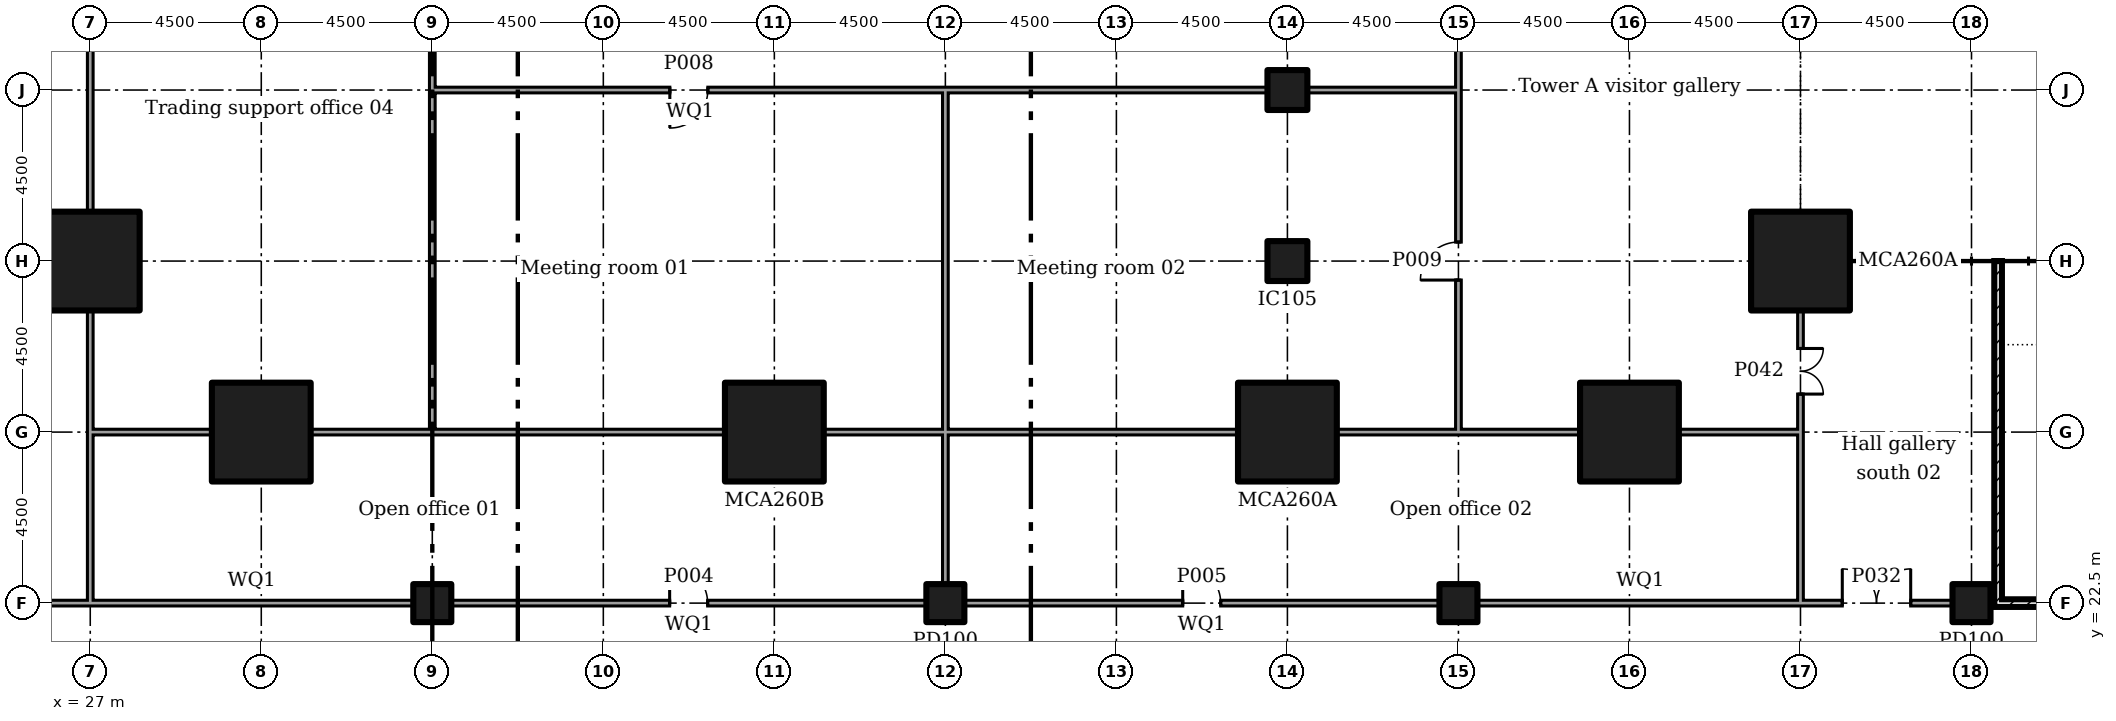
"""IFC4 building model, lengths in metres.
Left out: names, types, materials, properties, quantities, classifications, styles, units other than length and angle.
Written with IfcOpenShell. Run it as: python <this file> out.ifc"""

import sys

from ifc_helpers import new_model, si_unit, direction, frame, frame_2d, origin, origin_2d, place, context, subcontext, project, spatial, rectangle, extrude, element, fill, save


model = new_model("IFC4")
c1 = context("Model", 3, precision=1e-05, world=origin(), true_north=direction((0.0, 1.0)))
c2 = subcontext(c1, "Body", "Model", "MODEL_VIEW")
j1 = project(units=[si_unit("LENGTHUNIT", "METRE"), si_unit("PLANEANGLEUNIT", "RADIAN")], contexts=[c1])
p1 = place(None, origin())
s1 = spatial("IfcSite", under=j1, at=p1, CompositionType="ELEMENT")
p2 = place(p1, origin())
s2 = spatial("IfcBuilding", under=s1, at=p2, CompositionType="ELEMENT")
p3 = place(p2, frame((0.0, 0.0, 11.5)))
s3 = spatial("IfcBuildingStorey", under=s2, at=p3, CompositionType="ELEMENT", Elevation=11.5)
for number, where in (
    (1, (27.0, 31.5, 0.0)),
    (2, (31.5, 27.0, 0.0)),
    (3, (45.0, 27.0, 0.0)),
    (4, (58.5, 27.0, 0.0)),
    (5, (67.5, 27.0, 0.0)),
    (6, (72.0, 31.5, 0.0)),
):
    element("IfcColumn", number, at=place(p3, frame(where)), inside=s3, PredefinedType="COLUMN", context=c2, shape_type="SweptSolid", body=[
        extrude(rectangle(XDim=2.6, YDim=2.6, at=origin_2d()), origin(), (0.0, 0.0, 1.0), 5.0),
    ])
for number, where in (
    (7, (58.5, 31.5, 0.0)),
    (8, (58.5, 36.0, 0.0)),
):
    element("IfcColumn", number, at=place(p3, frame(where)), inside=s3, PredefinedType="COLUMN", context=c2, shape_type="SweptSolid", body=[
        extrude(rectangle(XDim=1.05, YDim=1.05, at=origin_2d()), origin(), (0.0, 0.0, 1.0), 5.0),
    ])
for number, where in (
    (9, (36.0, 22.5, 0.0)),
    (10, (49.5, 22.5, 0.0)),
    (11, (63.0, 22.5, 0.0)),
    (12, (76.5, 22.5, 0.0)),
):
    element("IfcColumn", number, at=place(p3, frame(where)), inside=s3, PredefinedType="COLUMN", context=c2, shape_type="SweptSolid", body=[
        extrude(rectangle(XDim=1.0, YDim=1.0, at=origin_2d()), origin(), (0.0, 0.0, 1.0), 5.0),
    ])
p4 = place(p2, frame((0.0, 0.0, 6.0)))
s4 = spatial("IfcBuildingStorey", under=s2, at=p4, CompositionType="ELEMENT", Elevation=6.0)
p5 = place(p4, frame((72.0, 32.795, 0.0), z_axis=(0.0, 0.0, 1.0), x_axis=(0.0, 1.0, 0.0)))
e13 = element("IfcWall", 13, at=p5, inside=s4, PredefinedType="SOLIDWALL", context=c2, shape_type="SweptSolid", body=[
    extrude(rectangle(XDim=10.91, YDim=0.3, at=frame_2d((5.455, 0.0))), origin(), (0.0, 0.0, 1.0), 10.05),
])
p6 = place(p5, frame((4.55, 0.0, 0.0)))
e14 = element("IfcOpeningElement", 14, at=p6, cuts=e13, PredefinedType="OPENING", context=c2, shape_type="SweptSolid", body=[
    extrude(rectangle(XDim=1.8, YDim=2.1, at=frame_2d((0.9, 1.05))), frame((0.0, 0.16, 0.0), z_axis=(0.0, -1.0, 0.0), x_axis=(1.0, 0.0, 0.0)), (0.0, 0.0, 1.0), 0.32),
])
p7 = place(p3, frame((22.995, 22.5, 0.0)))
e15 = element("IfcWall", 15, at=p7, inside=s3, PredefinedType="PARTITIONING", context=c2, shape_type="SweptSolid", body=[
    extrude(rectangle(XDim=4.08, YDim=0.15, at=frame_2d((2.04, 0.0))), origin(), (0.0, 0.0, 1.0), 4.55),
])
p8 = place(p3, frame((27.0, 22.5, 0.0)))
e16 = element("IfcWall", 16, at=p8, inside=s3, PredefinedType="PARTITIONING", context=c2, shape_type="SweptSolid", body=[
    extrude(rectangle(XDim=8.505, YDim=0.15, at=frame_2d((4.252, 0.0))), origin(), (0.0, 0.0, 1.0), 4.55),
])
p9 = place(p3, frame((36.495, 22.5, 0.0)))
e17 = element("IfcWall", 17, at=p9, inside=s3, PredefinedType="PARTITIONING", context=c2, shape_type="SweptSolid", body=[
    extrude(rectangle(XDim=12.51, YDim=0.15, at=frame_2d((6.255, 0.0))), origin(), (0.0, 0.0, 1.0), 4.55),
])
p10 = place(p9, frame((5.75, 0.0, 0.0)))
e18 = element("IfcOpeningElement", 18, at=p10, cuts=e17, PredefinedType="OPENING", context=c2, shape_type="SweptSolid", body=[
    extrude(rectangle(XDim=1.0, YDim=2.1, at=frame_2d((0.5, 1.05))), frame((0.0, 0.085, 0.0), z_axis=(0.0, -1.0, 0.0), x_axis=(1.0, 0.0, 0.0)), (0.0, 0.0, 1.0), 0.17),
])
p11 = place(p3, frame((49.995, 22.5, 0.0)))
e19 = element("IfcWall", 19, at=p11, inside=s3, PredefinedType="PARTITIONING", context=c2, shape_type="SweptSolid", body=[
    extrude(rectangle(XDim=12.51, YDim=0.15, at=frame_2d((6.255, 0.0))), origin(), (0.0, 0.0, 1.0), 4.55),
])
p12 = place(p11, frame((5.75, 0.0, 0.0)))
e20 = element("IfcOpeningElement", 20, at=p12, cuts=e19, PredefinedType="OPENING", context=c2, shape_type="SweptSolid", body=[
    extrude(rectangle(XDim=1.0, YDim=2.1, at=frame_2d((0.5, 1.05))), frame((0.0, 0.085, 0.0), z_axis=(0.0, -1.0, 0.0), x_axis=(1.0, 0.0, 0.0)), (0.0, 0.0, 1.0), 0.17),
])
p13 = place(p3, frame((63.495, 22.5, 0.0)))
e21 = element("IfcWall", 21, at=p13, inside=s3, PredefinedType="PARTITIONING", context=c2, shape_type="SweptSolid", body=[
    extrude(rectangle(XDim=8.58, YDim=0.15, at=frame_2d((4.29, 0.0))), origin(), (0.0, 0.0, 1.0), 4.55),
])
p14 = place(p3, frame((72.0, 22.5, 0.0)))
e22 = element("IfcWall", 22, at=p14, inside=s3, PredefinedType="PARTITIONING", context=c2, shape_type="SweptSolid", body=[
    extrude(rectangle(XDim=4.005, YDim=0.15, at=frame_2d((2.002, 0.0))), origin(), (0.0, 0.0, 1.0), 4.55),
])
p15 = place(p14, frame((1.1, 0.0, 0.0)))
e23 = element("IfcOpeningElement", 23, at=p15, cuts=e22, PredefinedType="OPENING", context=c2, shape_type="SweptSolid", body=[
    extrude(rectangle(XDim=1.8, YDim=2.1, at=frame_2d((0.9, 1.05))), frame((0.0, 0.085, 0.0), z_axis=(0.0, -1.0, 0.0), x_axis=(1.0, 0.0, 0.0)), (0.0, 0.0, 1.0), 0.17),
])
p16 = place(p3, frame((77.1, 22.5, 0.0)))
e24 = element("IfcWall", 24, at=p16, inside=s3, PredefinedType="SOLIDWALL", context=c2, shape_type="SweptSolid", body=[
    extrude(rectangle(XDim=4.6, YDim=0.2, at=frame_2d((2.3, 0.0))), origin(), (0.0, 0.0, 1.0), 4.55),
])
p17 = place(p3, frame((27.0, 22.575, 0.0), z_axis=(0.0, 0.0, 1.0), x_axis=(0.0, 1.0, 0.0)))
e25 = element("IfcWall", 25, at=p17, inside=s3, PredefinedType="PARTITIONING", context=c2, shape_type="SweptSolid", body=[
    extrude(rectangle(XDim=4.5, YDim=0.15, at=frame_2d((2.25, 0.0))), origin(), (0.0, 0.0, 1.0), 4.55),
])
p18 = place(p3, frame((27.0, 27.0, 0.0), z_axis=(0.0, 0.0, 1.0), x_axis=(0.0, 1.0, 0.0)))
e26 = element("IfcWall", 26, at=p18, inside=s3, PredefinedType="PARTITIONING", context=c2, shape_type="SweptSolid", body=[
    extrude(rectangle(XDim=3.205, YDim=0.15, at=frame_2d((1.603, 0.0))), origin(), (0.0, 0.0, 1.0), 4.55),
])
p19 = place(p3, frame((27.0, 32.795, 0.0), z_axis=(0.0, 0.0, 1.0), x_axis=(0.0, 1.0, 0.0)))
e27 = element("IfcWall", 27, at=p19, inside=s3, PredefinedType="PARTITIONING", context=c2, shape_type="SweptSolid", body=[
    extrude(rectangle(XDim=7.63, YDim=0.15, at=frame_2d((3.815, 0.0))), origin(), (0.0, 0.0, 1.0), 4.55),
])
p20 = place(p3, frame((49.5, 22.995, 0.0), z_axis=(0.0, 0.0, 1.0), x_axis=(0.0, 1.0, 0.0)))
e28 = element("IfcWall", 28, at=p20, inside=s3, PredefinedType="PARTITIONING", context=c2, shape_type="SweptSolid", body=[
    extrude(rectangle(XDim=4.08, YDim=0.15, at=frame_2d((2.04, 0.0))), origin(), (0.0, 0.0, 1.0), 4.55),
])
p21 = place(p3, frame((35.925, 27.0, 0.0)))
e29 = element("IfcWall", 29, at=p21, inside=s3, PredefinedType="PARTITIONING", context=c2, shape_type="SweptSolid", body=[
    extrude(rectangle(XDim=7.78, YDim=0.15, at=frame_2d((3.89, 0.0))), origin(), (0.0, 0.0, 1.0), 4.55),
])
p22 = place(p3, frame((46.295, 27.0, 0.0)))
e30 = element("IfcWall", 30, at=p22, inside=s3, PredefinedType="PARTITIONING", context=c2, shape_type="SweptSolid", body=[
    extrude(rectangle(XDim=3.28, YDim=0.15, at=frame_2d((1.64, 0.0))), origin(), (0.0, 0.0, 1.0), 4.55),
])
p23 = place(p3, frame((27.075, 27.0, 0.0)))
e31 = element("IfcWall", 31, at=p23, inside=s3, PredefinedType="PARTITIONING", context=c2, shape_type="SweptSolid", body=[
    extrude(rectangle(XDim=3.13, YDim=0.15, at=frame_2d((1.565, 0.0))), origin(), (0.0, 0.0, 1.0), 4.55),
])
p24 = place(p3, frame((32.795, 27.0, 0.0)))
e32 = element("IfcWall", 32, at=p24, inside=s3, PredefinedType="PARTITIONING", context=c2, shape_type="SweptSolid", body=[
    extrude(rectangle(XDim=3.205, YDim=0.15, at=frame_2d((1.603, 0.0))), origin(), (0.0, 0.0, 1.0), 4.55),
])
for number, where in (
    (33, (62.925, 27.0, 0.0)),
    (34, (68.795, 27.0, 0.0)),
):
    element("IfcWall", number, at=place(p3, frame(where)), inside=s3, PredefinedType="PARTITIONING", context=c2, shape_type="SweptSolid", body=[
        extrude(rectangle(XDim=3.28, YDim=0.15, at=frame_2d((1.64, 0.0))), origin(), (0.0, 0.0, 1.0), 4.55),
    ])
p25 = place(p3, frame((49.575, 27.0, 0.0)))
e35 = element("IfcWall", 35, at=p25, inside=s3, PredefinedType="PARTITIONING", context=c2, shape_type="SweptSolid", body=[
    extrude(rectangle(XDim=7.63, YDim=0.15, at=frame_2d((3.815, 0.0))), origin(), (0.0, 0.0, 1.0), 4.55),
])
p26 = place(p3, frame((59.795, 27.0, 0.0)))
e36 = element("IfcWall", 36, at=p26, inside=s3, PredefinedType="PARTITIONING", context=c2, shape_type="SweptSolid", body=[
    extrude(rectangle(XDim=3.205, YDim=0.15, at=frame_2d((1.603, 0.0))), origin(), (0.0, 0.0, 1.0), 4.55),
])
p27 = place(p3, frame((72.0, 22.575, 0.0), z_axis=(0.0, 0.0, 1.0), x_axis=(0.0, 1.0, 0.0)))
e37 = element("IfcWall", 37, at=p27, inside=s3, PredefinedType="PARTITIONING", context=c2, shape_type="SweptSolid", body=[
    extrude(rectangle(XDim=4.35, YDim=0.15, at=frame_2d((2.175, 0.0))), origin(), (0.0, 0.0, 1.0), 4.55),
])
p28 = place(p3, frame((63.0, 27.075, 0.0), z_axis=(0.0, 0.0, 1.0), x_axis=(0.0, 1.0, 0.0)))
e38 = element("IfcWall", 38, at=p28, inside=s3, PredefinedType="PARTITIONING", context=c2, shape_type="SweptSolid", body=[
    extrude(rectangle(XDim=9.0, YDim=0.15, at=frame_2d((4.5, 0.0))), origin(), (0.0, 0.0, 1.0), 4.55),
])
p29 = place(p28, frame((3.925, 0.0, 0.0)))
e39 = element("IfcOpeningElement", 39, at=p29, cuts=e38, PredefinedType="OPENING", context=c2, shape_type="SweptSolid", body=[
    extrude(rectangle(XDim=1.0, YDim=2.1, at=frame_2d((0.5, 1.05))), frame((0.0, 0.085, 0.0), z_axis=(0.0, -1.0, 0.0), x_axis=(1.0, 0.0, 0.0)), (0.0, 0.0, 1.0), 0.17),
])
p30 = place(p3, frame((63.0, 36.0, 0.0), z_axis=(0.0, 0.0, 1.0), x_axis=(0.0, 1.0, 0.0)))
e40 = element("IfcWall", 40, at=p30, inside=s3, PredefinedType="PARTITIONING", context=c2, shape_type="SweptSolid", body=[
    extrude(rectangle(XDim=21.98, YDim=0.15, at=frame_2d((10.99, 0.0))), origin(), (0.0, 0.0, 1.0), 4.55),
])
p31 = place(p30, frame((10.1, 0.0, 0.0)))
e41 = element("IfcOpeningElement", 41, at=p31, cuts=e40, PredefinedType="OPENING", context=c2, shape_type="SweptSolid", body=[
    extrude(rectangle(XDim=1.8, YDim=2.1, at=frame_2d((0.9, 1.05))), frame((0.0, 0.085, 0.0), z_axis=(0.0, -1.0, 0.0), x_axis=(1.0, 0.0, 0.0)), (0.0, 0.0, 1.0), 0.17),
])
p32 = place(p3, frame((72.0, 27.0, 0.0), z_axis=(0.0, 0.0, 1.0), x_axis=(0.0, 1.0, 0.0)))
e42 = element("IfcWall", 42, at=p32, inside=s3, PredefinedType="PARTITIONING", context=c2, shape_type="SweptSolid", body=[
    extrude(rectangle(XDim=3.205, YDim=0.15, at=frame_2d((1.603, 0.0))), origin(), (0.0, 0.0, 1.0), 4.55),
])
p33 = place(p32, frame((1.0, 0.0, 0.0)))
e43 = element("IfcOpeningElement", 43, at=p33, cuts=e42, PredefinedType="OPENING", context=c2, shape_type="SweptSolid", body=[
    extrude(rectangle(XDim=1.2, YDim=2.1, at=frame_2d((0.6, 1.05))), frame((0.0, 0.085, 0.0), z_axis=(0.0, -1.0, 0.0), x_axis=(1.0, 0.0, 0.0)), (0.0, 0.0, 1.0), 0.17),
])
for number, where, z_axis, x_axis in (
    (44, (49.5, 27.075, 0.0), (0.0, 0.0, 1.0), (0.0, 1.0, 0.0)),
    (45, (36.0, 27.075, 0.0), (0.0, 0.0, 1.0), (0.0, 1.0, 0.0)),
):
    element("IfcWall", number, at=place(p3, frame(where, z_axis=z_axis, x_axis=x_axis)), inside=s3, PredefinedType="PARTITIONING", context=c2, shape_type="SweptSolid", body=[
        extrude(rectangle(XDim=9.0, YDim=0.15, at=frame_2d((4.5, 0.0))), origin(), (0.0, 0.0, 1.0), 4.55),
    ])
p34 = place(p3, frame((36.075, 36.0, 0.0)))
e46 = element("IfcWall", 46, at=p34, inside=s3, PredefinedType="PARTITIONING", context=c2, shape_type="SweptSolid", body=[
    extrude(rectangle(XDim=13.425, YDim=0.15, at=frame_2d((6.712, 0.0))), origin(), (0.0, 0.0, 1.0), 4.55),
])
p35 = place(p34, frame((6.175, 0.0, 0.0)))
e47 = element("IfcOpeningElement", 47, at=p35, cuts=e46, PredefinedType="OPENING", context=c2, shape_type="SweptSolid", body=[
    extrude(rectangle(XDim=1.0, YDim=2.1, at=frame_2d((0.5, 1.05))), frame((0.0, 0.085, 0.0), z_axis=(0.0, -1.0, 0.0), x_axis=(1.0, 0.0, 0.0)), (0.0, 0.0, 1.0), 0.17),
])
p36 = place(p3, frame((49.575, 36.0, 0.0)))
e48 = element("IfcWall", 48, at=p36, inside=s3, PredefinedType="PARTITIONING", context=c2, shape_type="SweptSolid", body=[
    extrude(rectangle(XDim=8.405, YDim=0.15, at=frame_2d((4.203, 0.0))), origin(), (0.0, 0.0, 1.0), 4.55),
])
p37 = place(p3, frame((59.02, 36.0, 0.0)))
e49 = element("IfcWall", 49, at=p37, inside=s3, PredefinedType="PARTITIONING", context=c2, shape_type="SweptSolid", body=[
    extrude(rectangle(XDim=3.905, YDim=0.15, at=frame_2d((1.953, 0.0))), origin(), (0.0, 0.0, 1.0), 4.55),
])
p38 = place(p3, frame((36.0, 36.0, 0.0), z_axis=(0.0, 0.0, 1.0), x_axis=(0.0, 1.0, 0.0)))
e50 = element("IfcWall", 50, at=p38, inside=s3, PredefinedType="PARTITIONING", context=c2, shape_type="SweptSolid", body=[
    extrude(rectangle(XDim=3.98, YDim=0.15, at=frame_2d((1.99, 0.0))), origin(), (0.0, 0.0, 1.0), 4.55),
])
p39 = place(p3, frame((77.2, 22.6, 0.0), z_axis=(0.0, 0.0, 1.0), x_axis=(0.0, 1.0, 0.0)))
e51 = element("IfcWall", 51, at=p39, inside=s3, PredefinedType="SOLIDWALL", context=c2, shape_type="SweptSolid", body=[
    extrude(rectangle(XDim=8.9, YDim=0.2, at=frame_2d((4.45, 0.0))), origin(), (0.0, 0.0, 1.0), 4.55),
])
p40 = place(p10, origin())
e52 = element("IfcDoor", 52, at=p40, inside=s3, OperationType="SINGLE_SWING_RIGHT", PredefinedType="DOOR", context=c2, shape_type="SweptSolid", body=[
    extrude(rectangle(XDim=1.0, YDim=2.1, at=frame_2d((0.5, 1.05))), frame((0.0, 0.025, 0.0), z_axis=(0.0, -1.0, 0.0), x_axis=(1.0, 0.0, 0.0)), (0.0, 0.0, 1.0), 0.05),
])
fill(e18, e52)
p41 = place(p12, origin())
e53 = element("IfcDoor", 53, at=p41, inside=s3, OperationType="SINGLE_SWING_RIGHT", PredefinedType="DOOR", context=c2, shape_type="SweptSolid", body=[
    extrude(rectangle(XDim=1.0, YDim=2.1, at=frame_2d((0.5, 1.05))), frame((0.0, 0.025, 0.0), z_axis=(0.0, -1.0, 0.0), x_axis=(1.0, 0.0, 0.0)), (0.0, 0.0, 1.0), 0.05),
])
fill(e20, e53)
p42 = place(p35, frame((1.0, 0.0, 0.0), x_axis=(-1.0, 0.0, 0.0)))
e54 = element("IfcDoor", 54, at=p42, inside=s3, OperationType="SINGLE_SWING_LEFT", PredefinedType="DOOR", context=c2, shape_type="SweptSolid", body=[
    extrude(rectangle(XDim=1.0, YDim=2.1, at=frame_2d((0.5, 1.05))), frame((0.0, 0.025, 0.0), z_axis=(0.0, -1.0, 0.0), x_axis=(1.0, 0.0, 0.0)), (0.0, 0.0, 1.0), 0.05),
])
fill(e47, e54)
p43 = place(p29, origin())
e55 = element("IfcDoor", 55, at=p43, inside=s3, OperationType="SINGLE_SWING_RIGHT", PredefinedType="DOOR", context=c2, shape_type="SweptSolid", body=[
    extrude(rectangle(XDim=1.0, YDim=2.1, at=frame_2d((0.5, 1.05))), frame((0.0, 0.025, 0.0), z_axis=(0.0, -1.0, 0.0), x_axis=(1.0, 0.0, 0.0)), (0.0, 0.0, 1.0), 0.05),
])
fill(e39, e55)
p44 = place(p15, origin())
e56 = element("IfcDoor", 56, at=p44, inside=s3, OperationType="DOUBLE_DOOR_SINGLE_SWING", PredefinedType="DOOR", context=c2, shape_type="SweptSolid", body=[
    extrude(rectangle(XDim=1.8, YDim=2.1, at=frame_2d((0.9, 1.05))), frame((0.0, 0.025, 0.0), z_axis=(0.0, -1.0, 0.0), x_axis=(1.0, 0.0, 0.0)), (0.0, 0.0, 1.0), 0.05),
])
fill(e23, e56)
p45 = place(p33, frame((1.2, 0.0, 0.0), x_axis=(-1.0, 0.0, 0.0)))
e57 = element("IfcDoor", 57, at=p45, inside=s3, OperationType="DOUBLE_DOOR_SINGLE_SWING", PredefinedType="DOOR", context=c2, shape_type="SweptSolid", body=[
    extrude(rectangle(XDim=1.2, YDim=2.1, at=frame_2d((0.6, 1.05))), frame((0.0, 0.025, 0.0), z_axis=(0.0, -1.0, 0.0), x_axis=(1.0, 0.0, 0.0)), (0.0, 0.0, 1.0), 0.05),
])
fill(e43, e57)
save(model, sys.argv[1])
